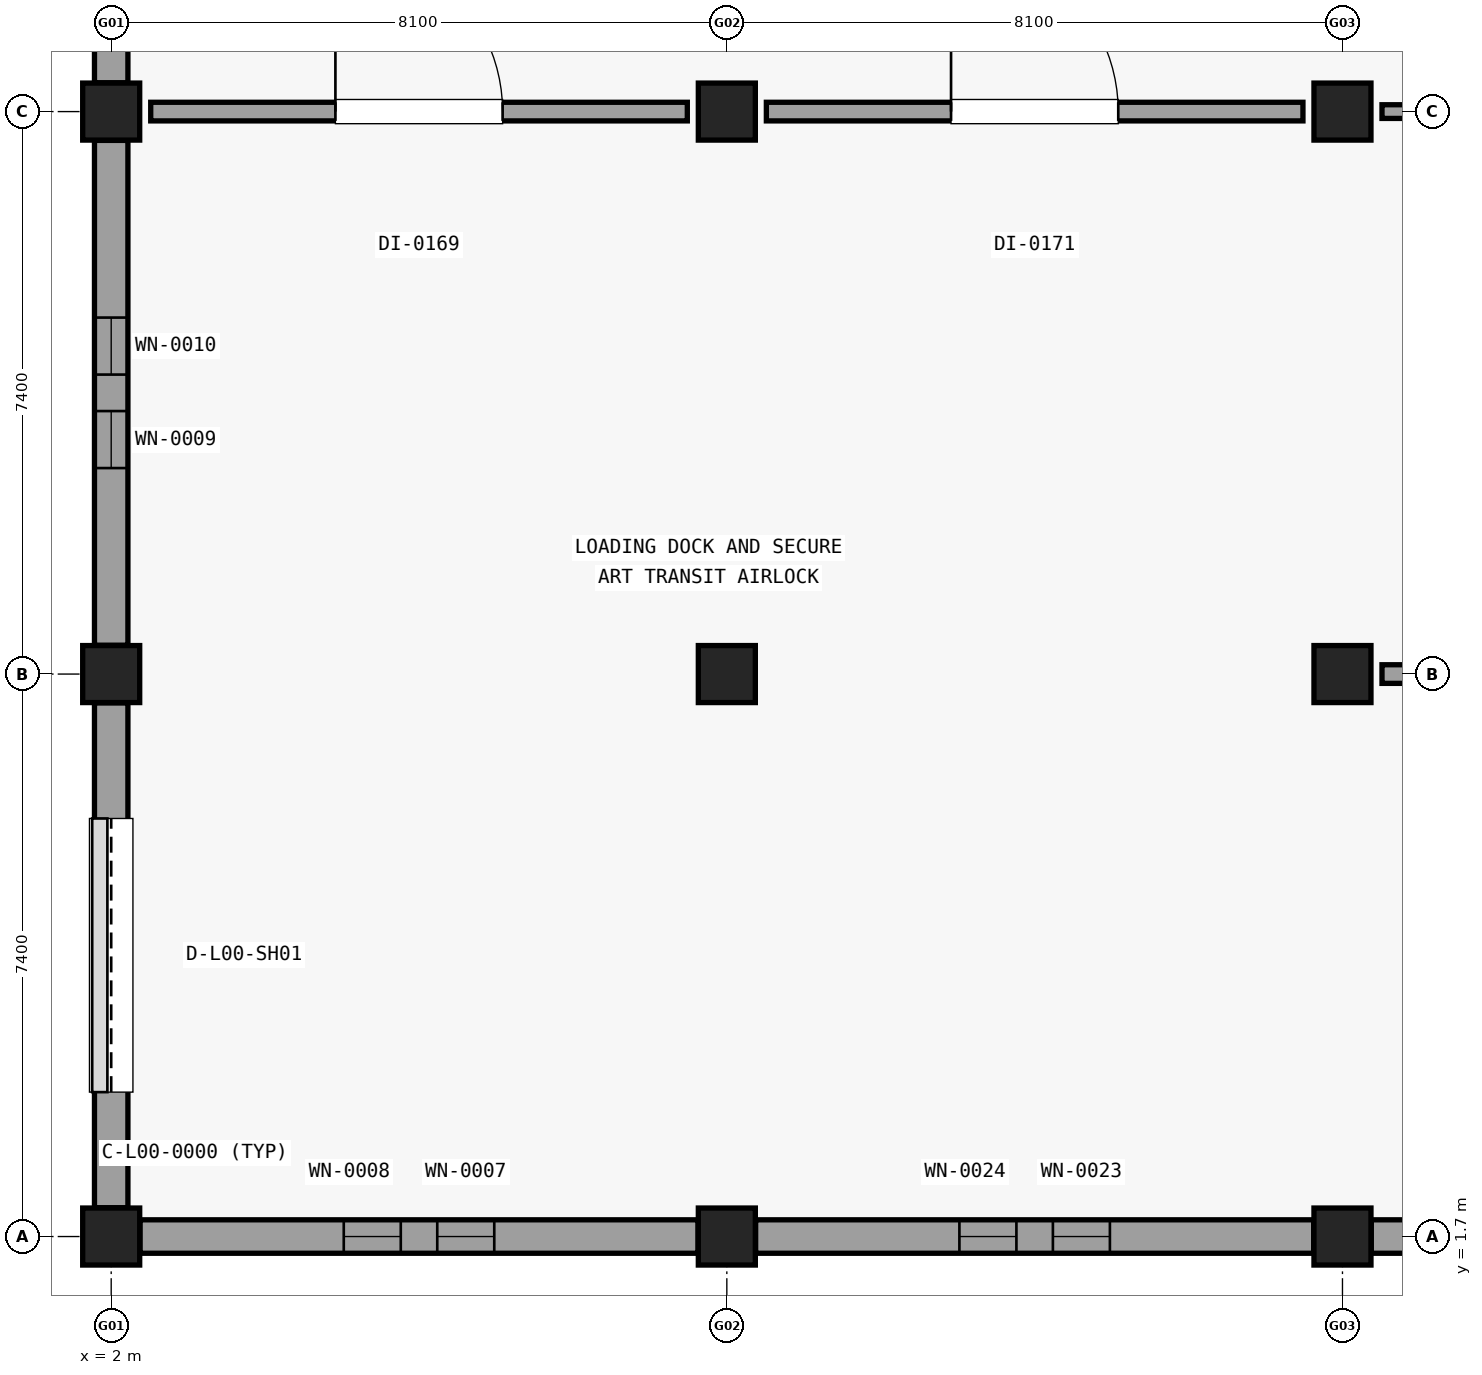
"""IFC4 building model, lengths in metres.
Left out: names, types, materials, properties, quantities, classifications, styles, units other than length and angle.
Written with IfcOpenShell. Run it as: python <this file> out.ifc"""

import sys

from ifc_helpers import new_model, si_unit, direction, frame, frame_2d, origin, origin_2d, place, context, subcontext, project, spatial, rectangle, extrude, element, fill, save


model = new_model("IFC4")
c1 = context("Model", 3, precision=1e-05, world=origin(), true_north=direction((0.0, 1.0)))
c2 = subcontext(c1, "Body", "Model", "MODEL_VIEW")
j1 = project(units=[si_unit("LENGTHUNIT", "METRE"), si_unit("PLANEANGLEUNIT", "RADIAN")], contexts=[c1])
p1 = place(None, origin())
s1 = spatial("IfcSite", under=j1, at=p1, CompositionType="ELEMENT")
p2 = place(p1, origin())
s2 = spatial("IfcBuilding", under=s1, at=p2, CompositionType="ELEMENT")
p3 = place(p2, origin())
s3 = spatial("IfcBuildingStorey", under=s2, at=p3, CompositionType="ELEMENT", Elevation=0.0)
for number, where, z_axis, x_axis in (
    (1, (2.0, 1.7, -0.28), (0.0, 0.0, 1.0), (1.0, 0.0, 0.0)),
    (2, (2.0, 9.1, -0.28), (0.0, 0.0, 1.0), (1.0, 0.0, 0.0)),
    (3, (2.0, 16.5, -0.28), (0.0, 0.0, 1.0), (1.0, 0.0, 0.0)),
    (4, (10.1, 1.7, -0.28), (0.0, 0.0, 1.0), (1.0, 0.0, 0.0)),
    (5, (10.1, 9.1, -0.28), (0.0, 0.0, 1.0), (1.0, 0.0, 0.0)),
    (6, (10.1, 16.5, -0.28), (0.0, 0.0, 1.0), (1.0, 0.0, 0.0)),
    (7, (18.2, 1.7, -0.28), (0.0, 0.0, 1.0), (1.0, 0.0, 0.0)),
    (8, (18.2, 9.1, -0.28), (0.0, 0.0, 1.0), (1.0, 0.0, 0.0)),
    (9, (18.2, 16.5, -0.28), (0.0, 0.0, 1.0), (1.0, 0.0, 0.0)),
):
    element("IfcColumn", number, at=place(p3, frame(where, z_axis=z_axis, x_axis=x_axis)), inside=s3, PredefinedType="COLUMN", context=c2, shape_type="SweptSolid", body=[
        extrude(rectangle(XDim=0.75, YDim=0.75, at=origin_2d()), origin(), (0.0, 0.0, 1.0), 5.415),
    ])
p4 = place(p3, frame((9.721, 1.7, 0.0), z_axis=(0.0, 0.0, 1.0), x_axis=(-1.0, 0.0, 0.0)))
e10 = element("IfcWall", 10, at=p4, inside=s3, PredefinedType="SOLIDWALL", context=c2, shape_type="SweptSolid", body=[
    extrude(rectangle(XDim=7.342, YDim=0.44, at=frame_2d((3.671, 0.0))), origin(), (0.0, 0.0, 1.0), 4.27),
])
p5 = place(p4, frame((2.681, 0.0, 0.65)))
e11 = element("IfcOpeningElement", 11, at=p5, cuts=e10, PredefinedType="OPENING", context=c2, shape_type="SweptSolid", body=[
    extrude(rectangle(XDim=0.75, YDim=3.1, at=frame_2d((0.375, 1.55))), frame((0.0, 0.23, 0.0), z_axis=(0.0, -1.0, 0.0), x_axis=(1.0, 0.0, 0.0)), (0.0, 0.0, 1.0), 0.46),
])
p6 = place(p4, frame((3.911, 0.0, 0.65)))
e12 = element("IfcOpeningElement", 12, at=p6, cuts=e10, PredefinedType="OPENING", context=c2, shape_type="SweptSolid", body=[
    extrude(rectangle(XDim=0.75, YDim=3.1, at=frame_2d((0.375, 1.55))), frame((0.0, 0.23, 0.0), z_axis=(0.0, -1.0, 0.0), x_axis=(1.0, 0.0, 0.0)), (0.0, 0.0, 1.0), 0.46),
])
p7 = place(p3, frame((2.0, 2.079, 0.0), z_axis=(0.0, 0.0, 1.0), x_axis=(0.0, 1.0, 0.0)))
e13 = element("IfcWall", 13, at=p7, inside=s3, PredefinedType="SOLIDWALL", context=c2, shape_type="SweptSolid", body=[
    extrude(rectangle(XDim=6.642, YDim=0.44, at=frame_2d((3.321, 0.0))), origin(), (0.0, 0.0, 1.0), 4.27),
])
p8 = place(p7, frame((1.521, 0.0, 0.0)))
e14 = element("IfcOpeningElement", 14, at=p8, cuts=e13, PredefinedType="OPENING", context=c2, shape_type="SweptSolid", body=[
    extrude(rectangle(XDim=3.6, YDim=4.02, at=frame_2d((1.8, 2.01))), frame((0.0, 0.23, 0.0), z_axis=(0.0, -1.0, 0.0), x_axis=(1.0, 0.0, 0.0)), (0.0, 0.0, 1.0), 0.46),
])
p9 = place(p3, frame((2.0, 9.479, 0.0), z_axis=(0.0, 0.0, 1.0), x_axis=(0.0, 1.0, 0.0)))
e15 = element("IfcWall", 15, at=p9, inside=s3, PredefinedType="SOLIDWALL", context=c2, shape_type="SweptSolid", body=[
    extrude(rectangle(XDim=6.642, YDim=0.44, at=frame_2d((3.321, 0.0))), origin(), (0.0, 0.0, 1.0), 4.27),
])
p10 = place(p9, frame((2.331, 0.0, 0.65)))
e16 = element("IfcOpeningElement", 16, at=p10, cuts=e15, PredefinedType="OPENING", context=c2, shape_type="SweptSolid", body=[
    extrude(rectangle(XDim=0.75, YDim=3.1, at=frame_2d((0.375, 1.55))), frame((0.0, 0.23, 0.0), z_axis=(0.0, -1.0, 0.0), x_axis=(1.0, 0.0, 0.0)), (0.0, 0.0, 1.0), 0.46),
])
p11 = place(p9, frame((3.561, 0.0, 0.65)))
e17 = element("IfcOpeningElement", 17, at=p11, cuts=e15, PredefinedType="OPENING", context=c2, shape_type="SweptSolid", body=[
    extrude(rectangle(XDim=0.75, YDim=3.1, at=frame_2d((0.375, 1.55))), frame((0.0, 0.23, 0.0), z_axis=(0.0, -1.0, 0.0), x_axis=(1.0, 0.0, 0.0)), (0.0, 0.0, 1.0), 0.46),
])
p12 = place(p3, frame((2.0, 16.879, 0.0), z_axis=(0.0, 0.0, 1.0), x_axis=(0.0, 1.0, 0.0)))
e18 = element("IfcWall", 18, at=p12, inside=s3, PredefinedType="SOLIDWALL", context=c2, shape_type="SweptSolid", body=[
    extrude(rectangle(XDim=6.642, YDim=0.44, at=frame_2d((3.321, 0.0))), origin(), (0.0, 0.0, 1.0), 4.27),
])
p13 = place(p12, frame((2.331, 0.0, 0.65)))
e19 = element("IfcOpeningElement", 19, at=p13, cuts=e18, PredefinedType="OPENING", context=c2, shape_type="SweptSolid", body=[
    extrude(rectangle(XDim=0.75, YDim=3.1, at=frame_2d((0.375, 1.55))), frame((0.0, 0.23, 0.0), z_axis=(0.0, -1.0, 0.0), x_axis=(1.0, 0.0, 0.0)), (0.0, 0.0, 1.0), 0.46),
])
p14 = place(p12, frame((3.561, 0.0, 0.65)))
e20 = element("IfcOpeningElement", 20, at=p14, cuts=e18, PredefinedType="OPENING", context=c2, shape_type="SweptSolid", body=[
    extrude(rectangle(XDim=0.75, YDim=3.1, at=frame_2d((0.375, 1.55))), frame((0.0, 0.23, 0.0), z_axis=(0.0, -1.0, 0.0), x_axis=(1.0, 0.0, 0.0)), (0.0, 0.0, 1.0), 0.46),
])
p15 = place(p3, frame((17.821, 1.7, 0.0), z_axis=(0.0, 0.0, 1.0), x_axis=(-1.0, 0.0, 0.0)))
e21 = element("IfcWall", 21, at=p15, inside=s3, PredefinedType="SOLIDWALL", context=c2, shape_type="SweptSolid", body=[
    extrude(rectangle(XDim=7.342, YDim=0.44, at=frame_2d((3.671, 0.0))), origin(), (0.0, 0.0, 1.0), 4.27),
])
p16 = place(p15, frame((2.681, 0.0, 0.65)))
e22 = element("IfcOpeningElement", 22, at=p16, cuts=e21, PredefinedType="OPENING", context=c2, shape_type="SweptSolid", body=[
    extrude(rectangle(XDim=0.75, YDim=3.1, at=frame_2d((0.375, 1.55))), frame((0.0, 0.23, 0.0), z_axis=(0.0, -1.0, 0.0), x_axis=(1.0, 0.0, 0.0)), (0.0, 0.0, 1.0), 0.46),
])
p17 = place(p15, frame((3.911, 0.0, 0.65)))
e23 = element("IfcOpeningElement", 23, at=p17, cuts=e21, PredefinedType="OPENING", context=c2, shape_type="SweptSolid", body=[
    extrude(rectangle(XDim=0.75, YDim=3.1, at=frame_2d((0.375, 1.55))), frame((0.0, 0.23, 0.0), z_axis=(0.0, -1.0, 0.0), x_axis=(1.0, 0.0, 0.0)), (0.0, 0.0, 1.0), 0.46),
])
p18 = place(p3, frame((25.921, 1.7, 0.0), z_axis=(0.0, 0.0, 1.0), x_axis=(-1.0, 0.0, 0.0)))
e24 = element("IfcWall", 24, at=p18, inside=s3, PredefinedType="SOLIDWALL", context=c2, shape_type="SweptSolid", body=[
    extrude(rectangle(XDim=7.342, YDim=0.44, at=frame_2d((3.671, 0.0))), origin(), (0.0, 0.0, 1.0), 4.27),
])
p19 = place(p18, frame((2.681, 0.0, 0.65)))
e25 = element("IfcOpeningElement", 25, at=p19, cuts=e24, PredefinedType="OPENING", context=c2, shape_type="SweptSolid", body=[
    extrude(rectangle(XDim=0.75, YDim=3.1, at=frame_2d((0.375, 1.55))), frame((0.0, 0.23, 0.0), z_axis=(0.0, -1.0, 0.0), x_axis=(1.0, 0.0, 0.0)), (0.0, 0.0, 1.0), 0.46),
])
p20 = place(p18, frame((3.911, 0.0, 0.65)))
e26 = element("IfcOpeningElement", 26, at=p20, cuts=e24, PredefinedType="OPENING", context=c2, shape_type="SweptSolid", body=[
    extrude(rectangle(XDim=0.75, YDim=3.1, at=frame_2d((0.375, 1.55))), frame((0.0, 0.23, 0.0), z_axis=(0.0, -1.0, 0.0), x_axis=(1.0, 0.0, 0.0)), (0.0, 0.0, 1.0), 0.46),
])
p21 = place(p3, frame((2.52, 16.5, 0.0), z_axis=(0.0, 0.0, 1.0), x_axis=(1.0, 0.0, 0.0)))
e27 = element("IfcWall", 27, at=p21, inside=s3, PredefinedType="PARTITIONING", context=c2, shape_type="SweptSolid", body=[
    extrude(rectangle(XDim=7.06, YDim=0.245, at=frame_2d((3.53, 0.0))), origin(), (0.0, 0.0, 1.0), 4.275),
])
p22 = place(p21, frame((2.43, 0.0, 0.0)))
e28 = element("IfcOpeningElement", 28, at=p22, cuts=e27, PredefinedType="OPENING", context=c2, shape_type="SweptSolid", body=[
    extrude(rectangle(XDim=2.2, YDim=2.65, at=frame_2d((1.1, 1.325))), frame((0.0, 0.133, 0.0), z_axis=(0.0, -1.0, 0.0), x_axis=(1.0, 0.0, 0.0)), (0.0, 0.0, 1.0), 0.265),
])
p23 = place(p3, frame((18.72, 9.1, 0.0), z_axis=(0.0, 0.0, 1.0), x_axis=(1.0, 0.0, 0.0)))
e29 = element("IfcWall", 29, at=p23, inside=s3, PredefinedType="PARTITIONING", context=c2, shape_type="SweptSolid", body=[
    extrude(rectangle(XDim=7.06, YDim=0.245, at=frame_2d((3.53, 0.0))), origin(), (0.0, 0.0, 1.0), 4.275),
])
p24 = place(p23, frame((2.955, 0.0, 0.0)))
e30 = element("IfcOpeningElement", 30, at=p24, cuts=e29, PredefinedType="OPENING", context=c2, shape_type="SweptSolid", body=[
    extrude(rectangle(XDim=1.15, YDim=2.15, at=frame_2d((0.575, 1.075))), frame((0.0, 0.133, 0.0), z_axis=(0.0, -1.0, 0.0), x_axis=(1.0, 0.0, 0.0)), (0.0, 0.0, 1.0), 0.265),
])
p25 = place(p3, frame((10.62, 16.5, 0.0), z_axis=(0.0, 0.0, 1.0), x_axis=(1.0, 0.0, 0.0)))
e31 = element("IfcWall", 31, at=p25, inside=s3, PredefinedType="PARTITIONING", context=c2, shape_type="SweptSolid", body=[
    extrude(rectangle(XDim=7.06, YDim=0.245, at=frame_2d((3.53, 0.0))), origin(), (0.0, 0.0, 1.0), 4.275),
])
p26 = place(p25, frame((2.43, 0.0, 0.0)))
e32 = element("IfcOpeningElement", 32, at=p26, cuts=e31, PredefinedType="OPENING", context=c2, shape_type="SweptSolid", body=[
    extrude(rectangle(XDim=2.2, YDim=2.65, at=frame_2d((1.1, 1.325))), frame((0.0, 0.133, 0.0), z_axis=(0.0, -1.0, 0.0), x_axis=(1.0, 0.0, 0.0)), (0.0, 0.0, 1.0), 0.265),
])
p27 = place(p3, frame((18.72, 16.5, 0.0), z_axis=(0.0, 0.0, 1.0), x_axis=(1.0, 0.0, 0.0)))
e33 = element("IfcWall", 33, at=p27, inside=s3, PredefinedType="PARTITIONING", context=c2, shape_type="SweptSolid", body=[
    extrude(rectangle(XDim=7.06, YDim=0.18, at=frame_2d((3.53, 0.0))), origin(), (0.0, 0.0, 1.0), 4.275),
])
p28 = place(p27, frame((2.88, 0.0, 0.0)))
e34 = element("IfcOpeningElement", 34, at=p28, cuts=e33, PredefinedType="OPENING", context=c2, shape_type="SweptSolid", body=[
    extrude(rectangle(XDim=1.3, YDim=2.2, at=frame_2d((0.65, 1.1))), frame((0.0, 0.1, 0.0), z_axis=(0.0, -1.0, 0.0), x_axis=(1.0, 0.0, 0.0)), (0.0, 0.0, 1.0), 0.2),
])
p29 = place(p5, origin())
e35 = element("IfcWindow", 35, at=p29, inside=s3, PartitioningType="SINGLE_PANEL", PredefinedType="WINDOW", context=c2, shape_type="SweptSolid", body=[
    extrude(rectangle(XDim=0.75, YDim=3.1, at=frame_2d((0.375, 1.55))), frame((0.0, 0.03, 0.0), z_axis=(0.0, -1.0, 0.0), x_axis=(1.0, 0.0, 0.0)), (0.0, 0.0, 1.0), 0.06),
])
fill(e11, e35)
p30 = place(p6, origin())
e36 = element("IfcWindow", 36, at=p30, inside=s3, PartitioningType="SINGLE_PANEL", PredefinedType="WINDOW", context=c2, shape_type="SweptSolid", body=[
    extrude(rectangle(XDim=0.75, YDim=3.1, at=frame_2d((0.375, 1.55))), frame((0.0, 0.03, 0.0), z_axis=(0.0, -1.0, 0.0), x_axis=(1.0, 0.0, 0.0)), (0.0, 0.0, 1.0), 0.06),
])
fill(e12, e36)
p31 = place(p8, origin())
e37 = element("IfcDoor", 37, at=p31, inside=s3, OperationType="ROLLINGUP", PredefinedType="DOOR", context=c2, shape_type="SweptSolid", body=[
    extrude(rectangle(XDim=3.6, YDim=4.02, at=frame_2d((1.8, 2.01))), frame((0.0, 0.025, 0.0), z_axis=(0.0, -1.0, 0.0), x_axis=(1.0, 0.0, 0.0)), (0.0, 0.0, 1.0), 0.05),
])
fill(e14, e37)
p32 = place(p10, origin())
e38 = element("IfcWindow", 38, at=p32, inside=s3, PartitioningType="SINGLE_PANEL", PredefinedType="WINDOW", context=c2, shape_type="SweptSolid", body=[
    extrude(rectangle(XDim=0.75, YDim=3.1, at=frame_2d((0.375, 1.55))), frame((0.0, 0.03, 0.0), z_axis=(0.0, -1.0, 0.0), x_axis=(1.0, 0.0, 0.0)), (0.0, 0.0, 1.0), 0.06),
])
fill(e16, e38)
p33 = place(p11, origin())
e39 = element("IfcWindow", 39, at=p33, inside=s3, PartitioningType="SINGLE_PANEL", PredefinedType="WINDOW", context=c2, shape_type="SweptSolid", body=[
    extrude(rectangle(XDim=0.75, YDim=3.1, at=frame_2d((0.375, 1.55))), frame((0.0, 0.03, 0.0), z_axis=(0.0, -1.0, 0.0), x_axis=(1.0, 0.0, 0.0)), (0.0, 0.0, 1.0), 0.06),
])
fill(e17, e39)
p34 = place(p16, origin())
e40 = element("IfcWindow", 40, at=p34, inside=s3, PartitioningType="SINGLE_PANEL", PredefinedType="WINDOW", context=c2, shape_type="SweptSolid", body=[
    extrude(rectangle(XDim=0.75, YDim=3.1, at=frame_2d((0.375, 1.55))), frame((0.0, 0.03, 0.0), z_axis=(0.0, -1.0, 0.0), x_axis=(1.0, 0.0, 0.0)), (0.0, 0.0, 1.0), 0.06),
])
fill(e22, e40)
p35 = place(p17, origin())
e41 = element("IfcWindow", 41, at=p35, inside=s3, PartitioningType="SINGLE_PANEL", PredefinedType="WINDOW", context=c2, shape_type="SweptSolid", body=[
    extrude(rectangle(XDim=0.75, YDim=3.1, at=frame_2d((0.375, 1.55))), frame((0.0, 0.03, 0.0), z_axis=(0.0, -1.0, 0.0), x_axis=(1.0, 0.0, 0.0)), (0.0, 0.0, 1.0), 0.06),
])
fill(e23, e41)
p36 = place(p22, origin())
e42 = element("IfcDoor", 42, at=p36, inside=s3, OperationType="SINGLE_SWING_LEFT", PredefinedType="DOOR", context=c2, shape_type="SweptSolid", body=[
    extrude(rectangle(XDim=2.2, YDim=2.65, at=frame_2d((1.1, 1.325))), frame((0.0, 0.025, 0.0), z_axis=(0.0, -1.0, 0.0), x_axis=(1.0, 0.0, 0.0)), (0.0, 0.0, 1.0), 0.05),
])
fill(e28, e42)
p37 = place(p26, origin())
e43 = element("IfcDoor", 43, at=p37, inside=s3, OperationType="SINGLE_SWING_LEFT", PredefinedType="DOOR", context=c2, shape_type="SweptSolid", body=[
    extrude(rectangle(XDim=2.2, YDim=2.65, at=frame_2d((1.1, 1.325))), frame((0.0, 0.025, 0.0), z_axis=(0.0, -1.0, 0.0), x_axis=(1.0, 0.0, 0.0)), (0.0, 0.0, 1.0), 0.05),
])
fill(e32, e43)
save(model, sys.argv[1])
